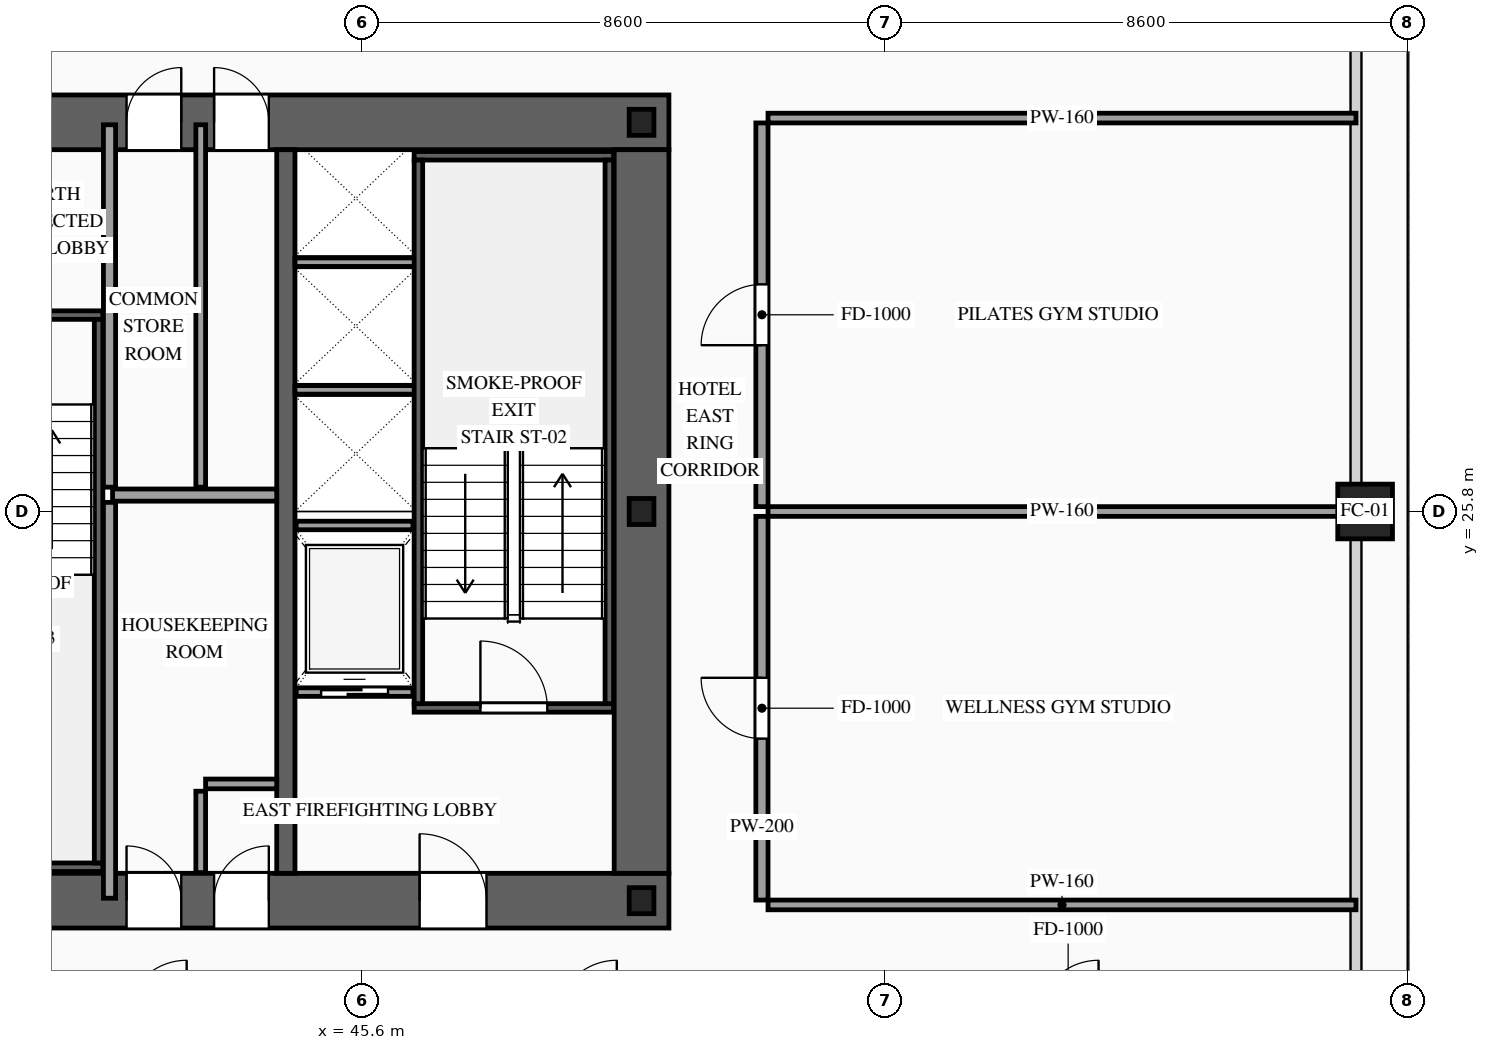
"""IFC4 building model, lengths in metres.
Left out: names, types, materials, properties, quantities, classifications, styles, units other than length and angle.
Written with IfcOpenShell. Run it as: python <this file> out.ifc"""

import sys

from ifc_helpers import new_model, si_unit, direction, frame, frame_2d, origin, origin_2d, place, context, subcontext, project, spatial, rectangle, hollow_rectangle, i_section, extrude, source, transform, mapped, element, fill, save


model = new_model("IFC4")
c1 = context("Model", 3, precision=1e-05, world=origin(), true_north=direction((0.0, 1.0)))
c2 = subcontext(c1, "Body", "Model", "MODEL_VIEW")
j1 = project(units=[si_unit("LENGTHUNIT", "METRE"), si_unit("PLANEANGLEUNIT", "RADIAN")], contexts=[c1])
p1 = place(None, origin())
s1 = spatial("IfcSite", under=j1, at=p1, CompositionType="ELEMENT")
p2 = place(p1, origin())
s2 = spatial("IfcBuilding", under=s1, at=p2, CompositionType="ELEMENT")
p3 = place(p2, frame((0.0, 0.0, 67.6)))
s3 = spatial("IfcBuildingStorey", under=s2, at=p3, CompositionType="ELEMENT", Elevation=67.6)
p4 = place(p3, frame((23.35, 19.4, 0.0), z_axis=(0.0, 0.0, 1.0), x_axis=(1.0, 0.0, 0.0)))
e1 = element("IfcWall", 1, at=p4, inside=s3, PredefinedType="SHEAR", context=c2, shape_type="SweptSolid", body=[
    extrude(rectangle(XDim=27.3, YDim=0.9, at=frame_2d((13.65, 0.0))), origin(), (0.0, 0.0, 1.0), 3.6),
])
p5 = place(p4, frame((2.1, 0.0, 0.0)))
e2 = element("IfcOpeningElement", 2, at=p5, cuts=e1, PredefinedType="OPENING", context=c2, shape_type="SweptSolid", body=[
    extrude(rectangle(XDim=1.1, YDim=2.2, at=frame_2d((0.55, 1.1))), frame((0.0, 0.465, 0.0), z_axis=(0.0, -1.0, 0.0), x_axis=(1.0, 0.0, 0.0)), (0.0, 0.0, 1.0), 0.93),
])
p6 = place(p4, frame((10.0, 0.0, 0.0)))
e3 = element("IfcOpeningElement", 3, at=p6, cuts=e1, PredefinedType="OPENING", context=c2, shape_type="SweptSolid", body=[
    extrude(rectangle(XDim=1.1, YDim=2.2, at=frame_2d((0.55, 1.1))), frame((0.0, 0.465, 0.0), z_axis=(0.0, -1.0, 0.0), x_axis=(1.0, 0.0, 0.0)), (0.0, 0.0, 1.0), 0.93),
])
p7 = place(p4, frame((23.2, 0.0, 0.0)))
e4 = element("IfcOpeningElement", 4, at=p7, cuts=e1, PredefinedType="OPENING", context=c2, shape_type="SweptSolid", body=[
    extrude(rectangle(XDim=1.1, YDim=2.2, at=frame_2d((0.55, 1.1))), frame((0.0, 0.465, 0.0), z_axis=(0.0, -1.0, 0.0), x_axis=(1.0, 0.0, 0.0)), (0.0, 0.0, 1.0), 0.93),
])
p8 = place(p4, frame((19.82, 0.0, 0.0)))
e5 = element("IfcOpeningElement", 5, at=p8, cuts=e1, PredefinedType="OPENING", context=c2, shape_type="SweptSolid", body=[
    extrude(rectangle(XDim=0.9, YDim=2.15, at=frame_2d((0.45, 1.075))), frame((0.0, 0.465, 0.0), z_axis=(0.0, -1.0, 0.0), x_axis=(1.0, 0.0, 0.0)), (0.0, 0.0, 1.0), 0.93),
])
p9 = place(p4, frame((18.38, 0.0, 0.0)))
e6 = element("IfcOpeningElement", 6, at=p9, cuts=e1, PredefinedType="OPENING", context=c2, shape_type="SweptSolid", body=[
    extrude(rectangle(XDim=0.9, YDim=2.15, at=frame_2d((0.45, 1.075))), frame((0.0, 0.465, 0.0), z_axis=(0.0, -1.0, 0.0), x_axis=(1.0, 0.0, 0.0)), (0.0, 0.0, 1.0), 0.93),
])
p10 = place(p3, frame((23.35, 32.2, 0.0), z_axis=(0.0, 0.0, 1.0), x_axis=(1.0, 0.0, 0.0)))
e7 = element("IfcWall", 7, at=p10, inside=s3, PredefinedType="SHEAR", context=c2, shape_type="SweptSolid", body=[
    extrude(rectangle(XDim=27.3, YDim=0.9, at=frame_2d((13.65, 0.0))), origin(), (0.0, 0.0, 1.0), 3.6),
])
p11 = place(p10, frame((4.72, 0.0, 0.0)))
e8 = element("IfcOpeningElement", 8, at=p11, cuts=e7, PredefinedType="OPENING", context=c2, shape_type="SweptSolid", body=[
    extrude(rectangle(XDim=0.9, YDim=2.15, at=frame_2d((0.45, 1.075))), frame((0.0, 0.465, 0.0), z_axis=(0.0, -1.0, 0.0), x_axis=(1.0, 0.0, 0.0)), (0.0, 0.0, 1.0), 0.93),
])
p12 = place(p10, frame((10.0, 0.0, 0.0)))
e9 = element("IfcOpeningElement", 9, at=p12, cuts=e7, PredefinedType="OPENING", context=c2, shape_type="SweptSolid", body=[
    extrude(rectangle(XDim=1.1, YDim=2.2, at=frame_2d((0.55, 1.1))), frame((0.0, 0.465, 0.0), z_axis=(0.0, -1.0, 0.0), x_axis=(1.0, 0.0, 0.0)), (0.0, 0.0, 1.0), 0.93),
])
p13 = place(p10, frame((15.85, 0.0, 0.0)))
e10 = element("IfcOpeningElement", 10, at=p13, cuts=e7, PredefinedType="OPENING", context=c2, shape_type="SweptSolid", body=[
    extrude(rectangle(XDim=1.1, YDim=2.2, at=frame_2d((0.55, 1.1))), frame((0.0, 0.465, 0.0), z_axis=(0.0, -1.0, 0.0), x_axis=(1.0, 0.0, 0.0)), (0.0, 0.0, 1.0), 0.93),
])
p14 = place(p10, frame((18.38, 0.0, 0.0)))
e11 = element("IfcOpeningElement", 11, at=p14, cuts=e7, PredefinedType="OPENING", context=c2, shape_type="SweptSolid", body=[
    extrude(rectangle(XDim=0.9, YDim=2.15, at=frame_2d((0.45, 1.075))), frame((0.0, 0.465, 0.0), z_axis=(0.0, -1.0, 0.0), x_axis=(1.0, 0.0, 0.0)), (0.0, 0.0, 1.0), 0.93),
])
p15 = place(p10, frame((19.82, 0.0, 0.0)))
e12 = element("IfcOpeningElement", 12, at=p15, cuts=e7, PredefinedType="OPENING", context=c2, shape_type="SweptSolid", body=[
    extrude(rectangle(XDim=0.9, YDim=2.15, at=frame_2d((0.45, 1.075))), frame((0.0, 0.465, 0.0), z_axis=(0.0, -1.0, 0.0), x_axis=(1.0, 0.0, 0.0)), (0.0, 0.0, 1.0), 0.93),
])
m1 = source(origin(), c2, "Body", "SweptSolid", [
    extrude(rectangle(XDim=11.9, YDim=0.9, at=frame_2d((5.95, 0.0))), origin(), (0.0, 0.0, 1.0), 3.6),
])
p16 = place(p3, frame((50.2, 19.85, 0.0), z_axis=(0.0, 0.0, 1.0), x_axis=(0.0, 1.0, 0.0)))
e13 = element("IfcWall", 13, at=p16, inside=s3, PredefinedType="SHEAR", context=c2, shape_type="MappedRepresentation", body=[
    mapped(m1, transform((0.0, 0.0, 0.0), scale=1.0)),
])
m2 = source(origin(), c2, "Body", "SweptSolid", [
    extrude(rectangle(XDim=11.9, YDim=0.3, at=frame_2d((5.95, 0.0))), origin(), (0.0, 0.0, 1.0), 3.6),
])
p17 = place(p3, frame((44.35, 19.85, 0.0), z_axis=(0.0, 0.0, 1.0), x_axis=(0.0, 1.0, 0.0)))
e14 = element("IfcWall", 14, at=p17, inside=s3, PredefinedType="SOLIDWALL", context=c2, shape_type="MappedRepresentation", body=[
    mapped(m2, transform((0.0, 0.0, 0.0), scale=1.0)),
])
m3 = source(origin(), c2, "Body", "SweptSolid", [
    extrude(i_section(OverallWidth=0.407, OverallDepth=0.428, WebThickness=0.02, FlangeThickness=0.035, at=origin_2d()), origin(), (0.0, 0.0, 1.0), 3.6),
])
for number, where, z_axis, x_axis in (
    (15, (50.2, 19.4, 0.0), (0.0, 0.0, 1.0), (1.0, 0.0, 0.0)),
    (16, (50.2, 25.8, 0.0), (0.0, 0.0, 1.0), (1.0, 0.0, 0.0)),
    (17, (50.2, 32.2, 0.0), (0.0, 0.0, 1.0), (1.0, 0.0, 0.0)),
):
    element("IfcColumn", number, at=place(p3, frame(where, z_axis=z_axis, x_axis=x_axis)), inside=s3, PredefinedType="COLUMN", context=c2, shape_type="MappedRepresentation", body=[
        mapped(m3, transform((0.0, 0.0, 0.0), scale=1.0)),
    ])
m4 = source(origin(), c2, "Body", "SweptSolid", [
    extrude(hollow_rectangle(XDim=0.9, YDim=0.9, WallThickness=0.042, at=origin_2d()), origin(), (0.0, 0.0, 1.0), 3.6),
])
p18 = place(p3, frame((62.1, 25.8, 0.0), z_axis=(0.0, 0.0, 1.0), x_axis=(1.0, 0.0, 0.0)))
e18 = element("IfcColumn", 18, at=p18, inside=s3, PredefinedType="COLUMN", context=c2, shape_type="MappedRepresentation", body=[
    mapped(m4, transform((0.0, 0.0, 0.0), scale=1.0)),
])
p19 = place(p3, frame((44.52, 22.83, 0.0), z_axis=(0.0, 0.0, 1.0), x_axis=(1.0, 0.0, 0.0)))
e19 = element("IfcWall", 19, at=p19, inside=s3, PredefinedType="SOLIDWALL", context=c2, shape_type="SweptSolid", body=[
    extrude(rectangle(XDim=1.92, YDim=0.14, at=frame_2d((0.96, 0.0))), origin(), (0.0, 0.0, 1.0), 3.38),
])
p20 = place(p19, frame((0.41, 0.0, 0.0)))
e20 = element("IfcOpeningElement", 20, at=p20, cuts=e19, PredefinedType="OPENING", context=c2, shape_type="SweptSolid", body=[
    extrude(rectangle(XDim=1.1, YDim=2.2, at=frame_2d((0.55, 1.1))), frame((0.0, 0.085, 0.0), z_axis=(0.0, -1.0, 0.0), x_axis=(1.0, 0.0, 0.0)), (0.0, 0.0, 1.0), 0.17),
])
m5 = source(origin(), c2, "Body", "SweptSolid", [
    extrude(rectangle(XDim=1.92, YDim=0.14, at=frame_2d((0.96, 0.0))), origin(), (0.0, 0.0, 1.0), 3.38),
])
p21 = place(p3, frame((44.52, 25.57, 0.0), z_axis=(0.0, 0.0, 1.0), x_axis=(1.0, 0.0, 0.0)))
e21 = element("IfcWall", 21, at=p21, inside=s3, PredefinedType="SOLIDWALL", context=c2, shape_type="MappedRepresentation", body=[
    mapped(m5, transform((0.0, 0.0, 0.0), scale=1.0)),
])
m6 = source(origin(), c2, "Body", "SweptSolid", [
    extrude(rectangle(XDim=2.0, YDim=0.14, at=frame_2d((1.0, 0.0))), origin(), (0.0, 0.0, 1.0), 3.38),
])
for number, where, z_axis, x_axis in (
    (22, (44.5, 27.8, 0.0), (0.0, 0.0, 1.0), (1.0, 0.0, 0.0)),
    (23, (44.5, 29.9, 0.0), (0.0, 0.0, 1.0), (1.0, 0.0, 0.0)),
):
    element("IfcWall", number, at=place(p3, frame(where, z_axis=z_axis, x_axis=x_axis)), inside=s3, PredefinedType="SOLIDWALL", context=c2, shape_type="MappedRepresentation", body=[
        mapped(m6, transform((0.0, 0.0, 0.0), scale=1.0)),
    ])
p22 = place(p3, frame((46.46, 22.57, 0.0), z_axis=(0.0, 0.0, 1.0), x_axis=(1.0, 0.0, 0.0)))
e24 = element("IfcWall", 24, at=p22, inside=s3, PredefinedType="SOLIDWALL", context=c2, shape_type="SweptSolid", body=[
    extrude(rectangle(XDim=3.28, YDim=0.14, at=frame_2d((1.64, 0.0))), origin(), (0.0, 0.0, 1.0), 3.38),
])
p23 = place(p22, frame((1.09, 0.0, 0.0)))
e25 = element("IfcOpeningElement", 25, at=p23, cuts=e24, PredefinedType="OPENING", context=c2, shape_type="SweptSolid", body=[
    extrude(rectangle(XDim=1.1, YDim=2.2, at=frame_2d((0.55, 1.1))), frame((0.0, 0.085, 0.0), z_axis=(0.0, -1.0, 0.0), x_axis=(1.0, 0.0, 0.0)), (0.0, 0.0, 1.0), 0.17),
])
m7 = source(origin(), c2, "Body", "SweptSolid", [
    extrude(rectangle(XDim=3.28, YDim=0.14, at=frame_2d((1.64, 0.0))), origin(), (0.0, 0.0, 1.0), 3.38),
])
p24 = place(p3, frame((46.46, 31.65, 0.0), z_axis=(0.0, 0.0, 1.0), x_axis=(1.0, 0.0, 0.0)))
e26 = element("IfcWall", 26, at=p24, inside=s3, PredefinedType="SOLIDWALL", context=c2, shape_type="MappedRepresentation", body=[
    mapped(m7, transform((0.0, 0.0, 0.0), scale=1.0)),
])
m8 = source(origin(), c2, "Body", "SweptSolid", [
    extrude(rectangle(XDim=8.94, YDim=0.14, at=frame_2d((4.47, 0.0))), origin(), (0.0, 0.0, 1.0), 3.38),
])
for number, where, z_axis, x_axis in (
    (27, (46.53, 22.64, 0.0), (0.0, 0.0, 1.0), (0.0, 1.0, 0.0)),
    (28, (49.67, 22.64, 0.0), (0.0, 0.0, 1.0), (0.0, 1.0, 0.0)),
):
    element("IfcWall", number, at=place(p3, frame(where, z_axis=z_axis, x_axis=x_axis)), inside=s3, PredefinedType="SOLIDWALL", context=c2, shape_type="MappedRepresentation", body=[
        mapped(m8, transform((0.0, 0.0, 0.0), scale=1.0)),
    ])
p25 = place(p3, frame((38.2, 29.03, 0.0), z_axis=(0.0, 0.0, 1.0), x_axis=(1.0, 0.0, 0.0)))
e29 = element("IfcWall", 29, at=p25, inside=s3, PredefinedType="SOLIDWALL", context=c2, shape_type="SweptSolid", body=[
    extrude(rectangle(XDim=3.14, YDim=0.14, at=frame_2d((1.57, 0.0))), origin(), (0.0, 0.0, 1.0), 3.38),
])
p26 = place(p25, frame((1.02, 0.0, 0.0)))
e30 = element("IfcOpeningElement", 30, at=p26, cuts=e29, PredefinedType="OPENING", context=c2, shape_type="SweptSolid", body=[
    extrude(rectangle(XDim=1.1, YDim=2.2, at=frame_2d((0.55, 1.1))), frame((0.0, 0.085, 0.0), z_axis=(0.0, -1.0, 0.0), x_axis=(1.0, 0.0, 0.0)), (0.0, 0.0, 1.0), 0.17),
])
m9 = source(origin(), c2, "Body", "SweptSolid", [
    extrude(rectangle(XDim=3.14, YDim=0.14, at=frame_2d((1.57, 0.0))), origin(), (0.0, 0.0, 1.0), 3.38),
])
p27 = place(p3, frame((38.2, 19.95, 0.0), z_axis=(0.0, 0.0, 1.0), x_axis=(1.0, 0.0, 0.0)))
e31 = element("IfcWall", 31, at=p27, inside=s3, PredefinedType="SOLIDWALL", context=c2, shape_type="MappedRepresentation", body=[
    mapped(m9, transform((0.0, 0.0, 0.0), scale=1.0)),
])
m10 = source(origin(), c2, "Body", "SweptSolid", [
    extrude(rectangle(XDim=8.94, YDim=0.14, at=frame_2d((4.47, 0.0))), origin(), (0.0, 0.0, 1.0), 3.38),
])
p28 = place(p3, frame((41.27, 20.02, 0.0), z_axis=(0.0, 0.0, 1.0), x_axis=(0.0, 1.0, 0.0)))
e32 = element("IfcWall", 32, at=p28, inside=s3, PredefinedType="SOLIDWALL", context=c2, shape_type="MappedRepresentation", body=[
    mapped(m10, transform((0.0, 0.0, 0.0), scale=1.0)),
])
m11 = source(origin(), c2, "Body", "SweptSolid", [
    extrude(rectangle(XDim=1.34, YDim=0.16, at=frame_2d((0.67, 0.0))), origin(), (0.0, 0.0, 1.0), 3.38),
])
p29 = place(p3, frame((42.95, 19.86, 0.0), z_axis=(0.0, 0.0, 1.0), x_axis=(0.0, 1.0, 0.0)))
e33 = element("IfcWall", 33, at=p29, inside=s3, PredefinedType="PARTITIONING", context=c2, shape_type="MappedRepresentation", body=[
    mapped(m11, transform((0.0, 0.0, 0.0), scale=1.0)),
])
m12 = source(origin(), c2, "Body", "SweptSolid", [
    extrude(rectangle(XDim=1.17, YDim=0.16, at=frame_2d((0.585, 0.0))), origin(), (0.0, 0.0, 1.0), 3.38),
])
p30 = place(p3, frame((43.03, 21.32, 0.0), z_axis=(0.0, 0.0, 1.0), x_axis=(1.0, 0.0, 0.0)))
e34 = element("IfcWall", 34, at=p30, inside=s3, PredefinedType="PARTITIONING", context=c2, shape_type="MappedRepresentation", body=[
    mapped(m12, transform((0.0, 0.0, 0.0), scale=1.0)),
])
m13 = source(origin(), c2, "Body", "SweptSolid", [
    extrude(rectangle(XDim=6.51, YDim=0.2, at=frame_2d((3.255, 0.0))), origin(), (0.0, 0.0, 1.0), 3.38),
])
p31 = place(p3, frame((41.45, 19.44, 0.0), z_axis=(0.0, 0.0, 1.0), x_axis=(0.0, 1.0, 0.0)))
e35 = element("IfcWall", 35, at=p31, inside=s3, PredefinedType="PARTITIONING", context=c2, shape_type="MappedRepresentation", body=[
    mapped(m13, transform((0.0, 0.0, 0.0), scale=1.0)),
])
m14 = source(origin(), c2, "Body", "SweptSolid", [
    extrude(rectangle(XDim=2.7, YDim=0.2, at=frame_2d((1.35, 0.0))), origin(), (0.0, 0.0, 1.0), 3.38),
])
p32 = place(p3, frame((41.5, 26.07, 0.0), z_axis=(0.0, 0.0, 1.0), x_axis=(1.0, 0.0, 0.0)))
e36 = element("IfcWall", 36, at=p32, inside=s3, PredefinedType="PARTITIONING", context=c2, shape_type="MappedRepresentation", body=[
    mapped(m14, transform((0.0, 0.0, 0.0), scale=1.0)),
])
m15 = source(origin(), c2, "Body", "SweptSolid", [
    extrude(rectangle(XDim=5.96, YDim=0.2, at=frame_2d((2.98, 0.0))), origin(), (0.0, 0.0, 1.0), 3.38),
])
p33 = place(p3, frame((41.45, 26.2, 0.0), z_axis=(0.0, 0.0, 1.0), x_axis=(0.0, 1.0, 0.0)))
e37 = element("IfcWall", 37, at=p33, inside=s3, PredefinedType="PARTITIONING", context=c2, shape_type="MappedRepresentation", body=[
    mapped(m15, transform((0.0, 0.0, 0.0), scale=1.0)),
])
m16 = source(origin(), c2, "Body", "SweptSolid", [
    extrude(rectangle(XDim=5.96, YDim=0.16, at=frame_2d((2.98, 0.0))), origin(), (0.0, 0.0, 1.0), 3.38),
])
p34 = place(p3, frame((42.95, 26.2, 0.0), z_axis=(0.0, 0.0, 1.0), x_axis=(0.0, 1.0, 0.0)))
e38 = element("IfcWall", 38, at=p34, inside=s3, PredefinedType="PARTITIONING", context=c2, shape_type="MappedRepresentation", body=[
    mapped(m16, transform((0.0, 0.0, 0.0), scale=1.0)),
])
p35 = place(p3, frame((52.18, 19.41, 0.0), z_axis=(0.0, 0.0, 1.0), x_axis=(0.0, 1.0, 0.0)))
e39 = element("IfcWall", 39, at=p35, inside=s3, PredefinedType="PARTITIONING", context=c2, shape_type="SweptSolid", body=[
    extrude(rectangle(XDim=6.31, YDim=0.2, at=frame_2d((3.155, 0.0))), origin(), (0.0, 0.0, 1.0), 3.38),
])
p36 = place(p35, frame((2.655, 0.0, 0.0)))
e40 = element("IfcOpeningElement", 40, at=p36, cuts=e39, PredefinedType="OPENING", context=c2, shape_type="SweptSolid", body=[
    extrude(rectangle(XDim=1.0, YDim=2.2, at=frame_2d((0.5, 1.1))), frame((0.0, 0.115, 0.0), z_axis=(0.0, -1.0, 0.0), x_axis=(1.0, 0.0, 0.0)), (0.0, 0.0, 1.0), 0.23),
])
m17 = source(origin(), c2, "Body", "SweptSolid", [
    extrude(rectangle(XDim=9.67, YDim=0.16, at=frame_2d((4.835, 0.0))), origin(), (0.0, 0.0, 1.0), 2.575),
])
p37 = place(p3, frame((52.28, 25.8, 0.0), z_axis=(0.0, 0.0, 1.0), x_axis=(1.0, 0.0, 0.0)))
e41 = element("IfcWall", 41, at=p37, inside=s3, PredefinedType="PARTITIONING", context=c2, shape_type="MappedRepresentation", body=[
    mapped(m17, transform((0.0, 0.0, 0.0), scale=1.0)),
])
m18 = source(origin(), c2, "Body", "SweptSolid", [
    extrude(rectangle(XDim=9.67, YDim=0.16, at=frame_2d((4.835, 0.0))), origin(), (0.0, 0.0, 1.0), 2.875),
])
p38 = place(p3, frame((52.28, 19.33, 0.0), z_axis=(0.0, 0.0, 1.0), x_axis=(1.0, 0.0, 0.0)))
e42 = element("IfcWall", 42, at=p38, inside=s3, PredefinedType="PARTITIONING", context=c2, shape_type="MappedRepresentation", body=[
    mapped(m18, transform((0.0, 0.0, 0.0), scale=1.0)),
])
p39 = place(p3, frame((52.18, 25.88, 0.0), z_axis=(0.0, 0.0, 1.0), x_axis=(0.0, 1.0, 0.0)))
e43 = element("IfcWall", 43, at=p39, inside=s3, PredefinedType="PARTITIONING", context=c2, shape_type="SweptSolid", body=[
    extrude(rectangle(XDim=6.31, YDim=0.2, at=frame_2d((3.155, 0.0))), origin(), (0.0, 0.0, 1.0), 3.38),
])
p40 = place(p39, frame((2.655, 0.0, 0.0)))
e44 = element("IfcOpeningElement", 44, at=p40, cuts=e43, PredefinedType="OPENING", context=c2, shape_type="SweptSolid", body=[
    extrude(rectangle(XDim=1.0, YDim=2.2, at=frame_2d((0.5, 1.1))), frame((0.0, 0.115, 0.0), z_axis=(0.0, -1.0, 0.0), x_axis=(1.0, 0.0, 0.0)), (0.0, 0.0, 1.0), 0.23),
])
p41 = place(p3, frame((52.28, 32.27, 0.0), z_axis=(0.0, 0.0, 1.0), x_axis=(1.0, 0.0, 0.0)))
e45 = element("IfcWall", 45, at=p41, inside=s3, PredefinedType="PARTITIONING", context=c2, shape_type="MappedRepresentation", body=[
    mapped(m18, transform((0.0, 0.0, 0.0), scale=1.0)),
])
m19 = source(origin(), c2, "Body", "SweptSolid", [
    extrude(rectangle(XDim=1.1, YDim=2.2, at=frame_2d((0.55, 1.1))), frame((0.0, 0.025, 0.0), z_axis=(0.0, -1.0, 0.0), x_axis=(1.0, 0.0, 0.0)), (0.0, 0.0, 1.0), 0.05),
])
p42 = place(p20, origin())
e46 = element("IfcDoor", 46, at=p42, inside=s3, OperationType="SLIDING_TO_RIGHT", PredefinedType="DOOR", context=c2, shape_type="MappedRepresentation", body=[
    mapped(m19, transform((0.0, 0.0, 0.0), scale=1.0)),
])
fill(e20, e46)
m20 = source(origin(), c2, "Body", "SweptSolid", [
    extrude(rectangle(XDim=1.1, YDim=2.2, at=frame_2d((0.55, 1.1))), frame((0.0, 0.025, 0.0), z_axis=(0.0, -1.0, 0.0), x_axis=(1.0, 0.0, 0.0)), (0.0, 0.0, 1.0), 0.05),
])
p43 = place(p23, origin())
e47 = element("IfcDoor", 47, at=p43, inside=s3, OperationType="SINGLE_SWING_LEFT", PredefinedType="DOOR", context=c2, shape_type="MappedRepresentation", body=[
    mapped(m20, transform((0.0, 0.0, 0.0), scale=1.0)),
])
fill(e25, e47)
p44 = place(p7, origin())
e48 = element("IfcDoor", 48, at=p44, inside=s3, OperationType="SINGLE_SWING_LEFT", PredefinedType="DOOR", context=c2, shape_type="MappedRepresentation", body=[
    mapped(m20, transform((0.0, 0.0, 0.0), scale=1.0)),
])
fill(e4, e48)
m21 = source(origin(), c2, "Body", "SweptSolid", [
    extrude(rectangle(XDim=0.9, YDim=2.15, at=frame_2d((0.45, 1.075))), frame((0.0, 0.025, 0.0), z_axis=(0.0, -1.0, 0.0), x_axis=(1.0, 0.0, 0.0)), (0.0, 0.0, 1.0), 0.05),
])
p45 = place(p8, origin())
e49 = element("IfcDoor", 49, at=p45, inside=s3, OperationType="SINGLE_SWING_RIGHT", PredefinedType="DOOR", context=c2, shape_type="MappedRepresentation", body=[
    mapped(m21, transform((0.0, 0.0, 0.0), scale=1.0)),
])
fill(e5, e49)
p46 = place(p9, origin())
e50 = element("IfcDoor", 50, at=p46, inside=s3, OperationType="SINGLE_SWING_LEFT", PredefinedType="DOOR", context=c2, shape_type="MappedRepresentation", body=[
    mapped(m21, transform((0.0, 0.0, 0.0), scale=1.0)),
])
fill(e6, e50)
p47 = place(p14, origin())
e51 = element("IfcDoor", 51, at=p47, inside=s3, OperationType="SINGLE_SWING_RIGHT", PredefinedType="DOOR", context=c2, shape_type="MappedRepresentation", body=[
    mapped(m21, transform((0.0, 0.0, 0.0), scale=1.0)),
])
fill(e11, e51)
p48 = place(p15, origin())
e52 = element("IfcDoor", 52, at=p48, inside=s3, OperationType="SINGLE_SWING_LEFT", PredefinedType="DOOR", context=c2, shape_type="MappedRepresentation", body=[
    mapped(m21, transform((0.0, 0.0, 0.0), scale=1.0)),
])
fill(e12, e52)
m22 = source(origin(), c2, "Body", "SweptSolid", [
    extrude(rectangle(XDim=1.0, YDim=2.2, at=frame_2d((0.5, 1.1))), frame((0.0, 0.025, 0.0), z_axis=(0.0, -1.0, 0.0), x_axis=(1.0, 0.0, 0.0)), (0.0, 0.0, 1.0), 0.05),
])
p49 = place(p36, origin())
e53 = element("IfcDoor", 53, at=p49, inside=s3, OperationType="SINGLE_SWING_RIGHT", PredefinedType="DOOR", context=c2, shape_type="MappedRepresentation", body=[
    mapped(m22, transform((0.0, 0.0, 0.0), scale=1.0)),
])
fill(e40, e53)
p50 = place(p40, origin())
e54 = element("IfcDoor", 54, at=p50, inside=s3, OperationType="SINGLE_SWING_LEFT", PredefinedType="DOOR", context=c2, shape_type="MappedRepresentation", body=[
    mapped(m22, transform((0.0, 0.0, 0.0), scale=1.0)),
])
fill(e44, e54)
save(model, sys.argv[1])
